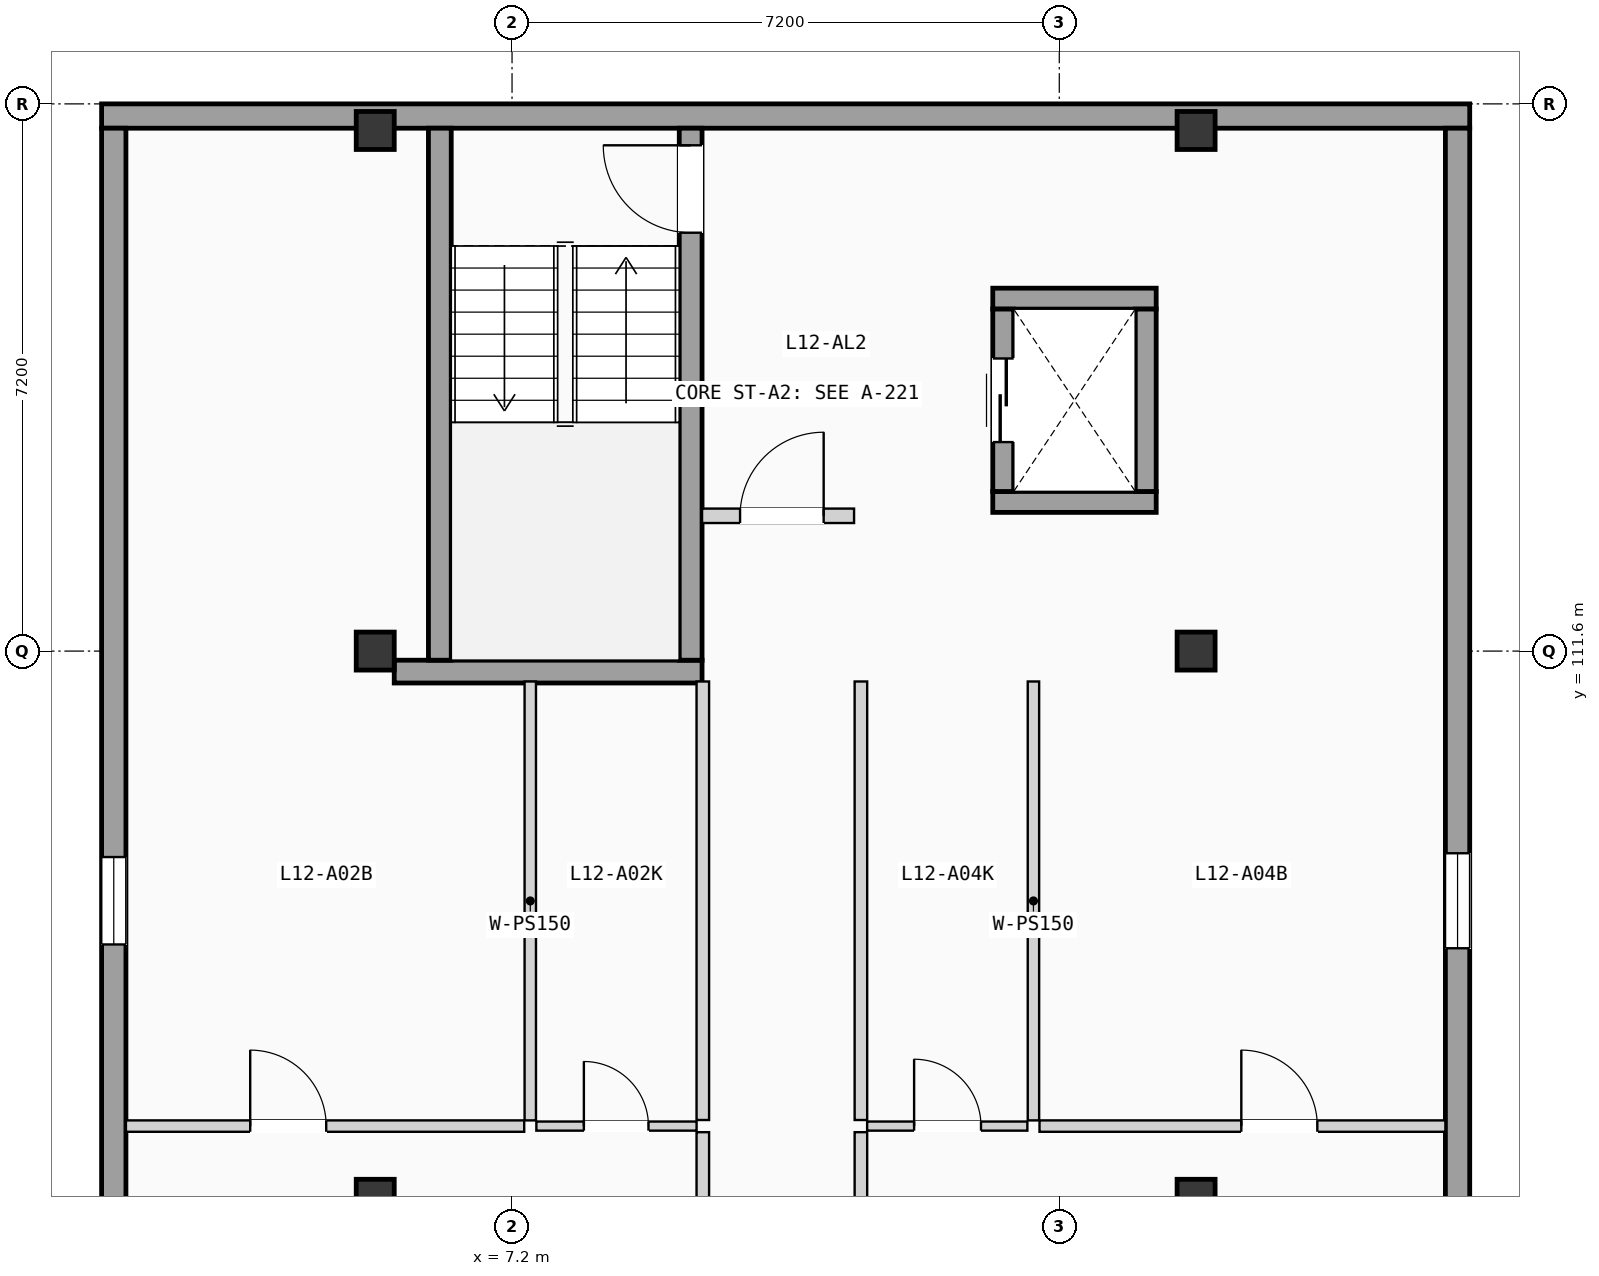
"""IFC4 building model, lengths in metres.
Left out: names, types, materials, properties, quantities, classifications, styles, units other than length and angle.
Written with IfcOpenShell. Run it as: python <this file> out.ifc"""

import sys

from ifc_helpers import new_model, si_unit, direction, frame, frame_2d, origin, origin_2d, place, context, subcontext, project, spatial, rectangle, extrude, element, fill, save


model = new_model("IFC4")
c1 = context("Model", 3, precision=1e-05, world=origin(), true_north=direction((0.0, 1.0)))
c2 = subcontext(c1, "Body", "Model", "MODEL_VIEW")
j1 = project(units=[si_unit("LENGTHUNIT", "METRE"), si_unit("PLANEANGLEUNIT", "RADIAN")], contexts=[c1])
p1 = place(None, origin())
s1 = spatial("IfcSite", under=j1, at=p1, CompositionType="ELEMENT")
p2 = place(p1, origin())
s2 = spatial("IfcBuilding", under=s1, at=p2, CompositionType="ELEMENT")
p3 = place(p2, frame((0.0, 0.0, 40.425)))
s3 = spatial("IfcBuildingStorey", under=s2, at=p3, CompositionType="ELEMENT", Elevation=40.425)
for number, where, z_axis, x_axis in (
    (1, (5.4, 104.4, 0.0), (0.0, 0.0, 1.0), (1.0, 0.0, 0.0)),
    (2, (5.4, 111.6, 0.0), (0.0, 0.0, 1.0), (1.0, 0.0, 0.0)),
    (3, (5.4, 118.45, 0.0), (0.0, 0.0, 1.0), (1.0, 0.0, 0.0)),
    (4, (16.2, 104.4, 0.0), (0.0, 0.0, 1.0), (1.0, 0.0, 0.0)),
    (5, (16.2, 111.6, 0.0), (0.0, 0.0, 1.0), (1.0, 0.0, 0.0)),
    (6, (16.2, 118.45, 0.0), (0.0, 0.0, 1.0), (1.0, 0.0, 0.0)),
):
    element("IfcColumn", number, at=place(p3, frame(where, z_axis=z_axis, x_axis=x_axis)), inside=s3, PredefinedType="COLUMN", context=c2, shape_type="SweptSolid", body=[
        extrude(rectangle(XDim=0.5, YDim=0.5, at=origin_2d()), origin(), (0.0, 0.0, 1.0), 3.15),
    ])
p4 = place(p3, frame((1.8, 118.64, 0.0), z_axis=(0.0, 0.0, 1.0), x_axis=(1.0, 0.0, 0.0)))
e7 = element("IfcWall", 7, at=p4, inside=s3, PredefinedType="SOLIDWALL", context=c2, shape_type="SweptSolid", body=[
    extrude(rectangle(XDim=18.0, YDim=0.32, at=frame_2d((9.0, 0.0))), origin(), (0.0, 0.0, 1.0), 2.89),
])
p5 = place(p3, frame((1.96, 68.72, 0.0), z_axis=(0.0, 0.0, 1.0), x_axis=(0.0, 1.0, 0.0)))
e8 = element("IfcWall", 8, at=p5, inside=s3, PredefinedType="SOLIDWALL", context=c2, shape_type="SweptSolid", body=[
    extrude(rectangle(XDim=49.76, YDim=0.32, at=frame_2d((24.88, 0.0))), origin(), (0.0, 0.0, 1.0), 2.89),
])
p6 = place(p5, frame((12.119, 0.0, 0.9)))
e9 = element("IfcOpeningElement", 9, at=p6, cuts=e8, PredefinedType="OPENING", context=c2, shape_type="SweptSolid", body=[
    extrude(rectangle(XDim=1.05, YDim=1.2, at=frame_2d((0.525, 0.6))), frame((0.0, 0.17, 0.0), z_axis=(0.0, -1.0, 0.0), x_axis=(1.0, 0.0, 0.0)), (0.0, 0.0, 1.0), 0.34),
])
p7 = place(p5, frame((8.774, 0.0, 0.855)))
e10 = element("IfcOpeningElement", 10, at=p7, cuts=e8, PredefinedType="OPENING", context=c2, shape_type="SweptSolid", body=[
    extrude(rectangle(XDim=1.05, YDim=1.35, at=frame_2d((0.525, 0.675))), frame((0.0, 0.17, 0.0), z_axis=(0.0, -1.0, 0.0), x_axis=(1.0, 0.0, 0.0)), (0.0, 0.0, 1.0), 0.34),
])
p8 = place(p5, frame((18.022, 0.0, 0.705)))
e11 = element("IfcOpeningElement", 11, at=p8, cuts=e8, PredefinedType="OPENING", context=c2, shape_type="SweptSolid", body=[
    extrude(rectangle(XDim=1.05, YDim=1.5, at=frame_2d((0.525, 0.75))), frame((0.0, 0.17, 0.0), z_axis=(0.0, -1.0, 0.0), x_axis=(1.0, 0.0, 0.0)), (0.0, 0.0, 1.0), 0.34),
])
p9 = place(p5, frame((31.555, 0.0, 0.555)))
e12 = element("IfcOpeningElement", 12, at=p9, cuts=e8, PredefinedType="OPENING", context=c2, shape_type="SweptSolid", body=[
    extrude(rectangle(XDim=1.05, YDim=1.65, at=frame_2d((0.525, 0.825))), frame((0.0, 0.17, 0.0), z_axis=(0.0, -1.0, 0.0), x_axis=(1.0, 0.0, 0.0)), (0.0, 0.0, 1.0), 0.34),
])
p10 = place(p5, frame((24.002, 0.0, 0.85)))
e13 = element("IfcOpeningElement", 13, at=p10, cuts=e8, PredefinedType="OPENING", context=c2, shape_type="SweptSolid", body=[
    extrude(rectangle(XDim=0.95, YDim=1.2, at=frame_2d((0.475, 0.6))), frame((0.0, 0.17, 0.0), z_axis=(0.0, -1.0, 0.0), x_axis=(1.0, 0.0, 0.0)), (0.0, 0.0, 1.0), 0.34),
])
p11 = place(p5, frame((39.02, 0.0, 0.9)))
e14 = element("IfcOpeningElement", 14, at=p11, cuts=e8, PredefinedType="OPENING", context=c2, shape_type="SweptSolid", body=[
    extrude(rectangle(XDim=1.15, YDim=1.2, at=frame_2d((0.575, 0.6))), frame((0.0, 0.17, 0.0), z_axis=(0.0, -1.0, 0.0), x_axis=(1.0, 0.0, 0.0)), (0.0, 0.0, 1.0), 0.34),
])
p12 = place(p3, frame((19.64, 68.72, 0.0), z_axis=(0.0, 0.0, 1.0), x_axis=(0.0, 1.0, 0.0)))
e15 = element("IfcWall", 15, at=p12, inside=s3, PredefinedType="SOLIDWALL", context=c2, shape_type="SweptSolid", body=[
    extrude(rectangle(XDim=49.76, YDim=0.32, at=frame_2d((24.88, 0.0))), origin(), (0.0, 0.0, 1.0), 2.89),
])
p13 = place(p12, frame((12.069, 0.0, 0.855)))
e16 = element("IfcOpeningElement", 16, at=p13, cuts=e15, PredefinedType="OPENING", context=c2, shape_type="SweptSolid", body=[
    extrude(rectangle(XDim=1.15, YDim=1.35, at=frame_2d((0.575, 0.675))), frame((0.0, 0.17, 0.0), z_axis=(0.0, -1.0, 0.0), x_axis=(1.0, 0.0, 0.0)), (0.0, 0.0, 1.0), 0.34),
])
p14 = place(p12, frame((8.724, 0.0, 0.705)))
e17 = element("IfcOpeningElement", 17, at=p14, cuts=e15, PredefinedType="OPENING", context=c2, shape_type="SweptSolid", body=[
    extrude(rectangle(XDim=1.15, YDim=1.5, at=frame_2d((0.575, 0.75))), frame((0.0, 0.17, 0.0), z_axis=(0.0, -1.0, 0.0), x_axis=(1.0, 0.0, 0.0)), (0.0, 0.0, 1.0), 0.34),
])
p15 = place(p12, frame((17.879, 0.0, 0.0)))
e18 = element("IfcOpeningElement", 18, at=p15, cuts=e15, PredefinedType="OPENING", context=c2, shape_type="SweptSolid", body=[
    extrude(rectangle(XDim=0.95, YDim=2.15, at=frame_2d((0.475, 1.075))), frame((0.0, 0.17, 0.0), z_axis=(0.0, -1.0, 0.0), x_axis=(1.0, 0.0, 0.0)), (0.0, 0.0, 1.0), 0.34),
])
p16 = place(p12, frame((31.505, 0.0, 0.555)))
e19 = element("IfcOpeningElement", 19, at=p16, cuts=e15, PredefinedType="OPENING", context=c2, shape_type="SweptSolid", body=[
    extrude(rectangle(XDim=1.15, YDim=1.65, at=frame_2d((0.575, 0.825))), frame((0.0, 0.17, 0.0), z_axis=(0.0, -1.0, 0.0), x_axis=(1.0, 0.0, 0.0)), (0.0, 0.0, 1.0), 0.34),
])
p17 = place(p12, frame((24.002, 0.0, 0.85)))
e20 = element("IfcOpeningElement", 20, at=p17, cuts=e15, PredefinedType="OPENING", context=c2, shape_type="SweptSolid", body=[
    extrude(rectangle(XDim=0.95, YDim=1.2, at=frame_2d((0.475, 0.6))), frame((0.0, 0.17, 0.0), z_axis=(0.0, -1.0, 0.0), x_axis=(1.0, 0.0, 0.0)), (0.0, 0.0, 1.0), 0.34),
])
p18 = place(p12, frame((38.97, 0.0, 0.9)))
e21 = element("IfcOpeningElement", 21, at=p18, cuts=e15, PredefinedType="OPENING", context=c2, shape_type="SweptSolid", body=[
    extrude(rectangle(XDim=1.25, YDim=1.2, at=frame_2d((0.625, 0.6))), frame((0.0, 0.17, 0.0), z_axis=(0.0, -1.0, 0.0), x_axis=(1.0, 0.0, 0.0)), (0.0, 0.0, 1.0), 0.34),
])
p19 = place(p3, frame((5.65, 111.33, 0.0), z_axis=(0.0, 0.0, 1.0), x_axis=(1.0, 0.0, 0.0)))
e22 = element("IfcWall", 22, at=p19, inside=s3, PredefinedType="SHEAR", context=c2, shape_type="SweptSolid", body=[
    extrude(rectangle(XDim=4.05, YDim=0.3, at=frame_2d((2.025, 0.0))), origin(), (0.0, 0.0, 1.0), 2.89),
])
p20 = place(p3, frame((6.25, 111.48, 0.0), z_axis=(0.0, 0.0, 1.0), x_axis=(0.0, 1.0, 0.0)))
e23 = element("IfcWall", 23, at=p20, inside=s3, PredefinedType="SHEAR", context=c2, shape_type="SweptSolid", body=[
    extrude(rectangle(XDim=7.0, YDim=0.3, at=frame_2d((3.5, 0.0))), origin(), (0.0, 0.0, 1.0), 2.89),
])
p21 = place(p3, frame((9.55, 111.48, 0.0), z_axis=(0.0, 0.0, 1.0), x_axis=(0.0, 1.0, 0.0)))
e24 = element("IfcWall", 24, at=p21, inside=s3, PredefinedType="SHEAR", context=c2, shape_type="SweptSolid", body=[
    extrude(rectangle(XDim=7.0, YDim=0.3, at=frame_2d((3.5, 0.0))), origin(), (0.0, 0.0, 1.0), 2.89),
])
p22 = place(p21, frame((5.625, 0.0, 0.0)))
e25 = element("IfcOpeningElement", 25, at=p22, cuts=e24, PredefinedType="OPENING", context=c2, shape_type="SweptSolid", body=[
    extrude(rectangle(XDim=1.15, YDim=2.12, at=frame_2d((0.575, 1.06))), frame((0.0, 0.16, 0.0), z_axis=(0.0, -1.0, 0.0), x_axis=(1.0, 0.0, 0.0)), (0.0, 0.0, 1.0), 0.32),
])
for number, where, z_axis, x_axis in (
    (26, (13.525, 113.562, 0.0), (0.0, 0.0, 1.0), (1.0, 0.0, 0.0)),
    (27, (13.525, 116.238, 0.0), (0.0, 0.0, 1.0), (1.0, 0.0, 0.0)),
):
    element("IfcWall", number, at=place(p3, frame(where, z_axis=z_axis, x_axis=x_axis)), inside=s3, PredefinedType="SHEAR", context=c2, shape_type="SweptSolid", body=[
        extrude(rectangle(XDim=2.15, YDim=0.275, at=frame_2d((1.075, 0.0))), origin(), (0.0, 0.0, 1.0), 2.89),
    ])
p23 = place(p3, frame((13.663, 113.7, 0.0), z_axis=(0.0, 0.0, 1.0), x_axis=(0.0, 1.0, 0.0)))
e28 = element("IfcWall", 28, at=p23, inside=s3, PredefinedType="SHEAR", context=c2, shape_type="SweptSolid", body=[
    extrude(rectangle(XDim=2.4, YDim=0.275, at=frame_2d((1.2, 0.0))), origin(), (0.0, 0.0, 1.0), 2.89),
])
p24 = place(p23, frame((0.65, 0.0, 0.0)))
e29 = element("IfcOpeningElement", 29, at=p24, cuts=e28, PredefinedType="OPENING", context=c2, shape_type="SweptSolid", body=[
    extrude(rectangle(XDim=1.1, YDim=2.15, at=frame_2d((0.55, 1.075))), frame((0.0, 0.147, 0.0), z_axis=(0.0, -1.0, 0.0), x_axis=(1.0, 0.0, 0.0)), (0.0, 0.0, 1.0), 0.295),
])
p25 = place(p3, frame((15.538, 113.7, 0.0), z_axis=(0.0, 0.0, 1.0), x_axis=(0.0, 1.0, 0.0)))
e30 = element("IfcWall", 30, at=p25, inside=s3, PredefinedType="SHEAR", context=c2, shape_type="SweptSolid", body=[
    extrude(rectangle(XDim=2.4, YDim=0.275, at=frame_2d((1.2, 0.0))), origin(), (0.0, 0.0, 1.0), 2.89),
])
p26 = place(p3, frame((9.7, 113.38, 0.0), z_axis=(0.0, 0.0, 1.0), x_axis=(1.0, 0.0, 0.0)))
e31 = element("IfcWall", 31, at=p26, inside=s3, PredefinedType="PARTITIONING", context=c2, shape_type="SweptSolid", body=[
    extrude(rectangle(XDim=2.0, YDim=0.19, at=frame_2d((1.0, 0.0))), origin(), (0.0, 0.0, 1.0), 2.87),
])
p27 = place(p26, frame((0.5, 0.0, 0.0)))
e32 = element("IfcOpeningElement", 32, at=p27, cuts=e31, PredefinedType="OPENING", context=c2, shape_type="SweptSolid", body=[
    extrude(rectangle(XDim=1.1, YDim=2.12, at=frame_2d((0.55, 1.06))), frame((0.0, 0.105, 0.0), z_axis=(0.0, -1.0, 0.0), x_axis=(1.0, 0.0, 0.0)), (0.0, 0.0, 1.0), 0.21),
])
p28 = place(p3, frame((9.71, 96.284, 0.0), z_axis=(0.0, 0.0, 1.0), x_axis=(0.0, 1.0, 0.0)))
e33 = element("IfcWall", 33, at=p28, inside=s3, PredefinedType="PARTITIONING", context=c2, shape_type="SweptSolid", body=[
    extrude(rectangle(XDim=8.986, YDim=0.165, at=frame_2d((4.493, 0.0))), origin(), (0.0, 0.0, 1.0), 2.87),
])
p29 = place(p28, frame((4.003, 0.0, 0.0)))
e34 = element("IfcOpeningElement", 34, at=p29, cuts=e33, PredefinedType="OPENING", context=c2, shape_type="SweptSolid", body=[
    extrude(rectangle(XDim=0.98, YDim=2.08, at=frame_2d((0.49, 1.04))), frame((0.0, 0.093, 0.0), z_axis=(0.0, -1.0, 0.0), x_axis=(1.0, 0.0, 0.0)), (0.0, 0.0, 1.0), 0.185),
])
p30 = place(p3, frame((9.71, 105.43, 0.0), z_axis=(0.0, 0.0, 1.0), x_axis=(0.0, 1.0, 0.0)))
e35 = element("IfcWall", 35, at=p30, inside=s3, PredefinedType="PARTITIONING", context=c2, shape_type="SweptSolid", body=[
    extrude(rectangle(XDim=5.77, YDim=0.165, at=frame_2d((2.885, 0.0))), origin(), (0.0, 0.0, 1.0), 2.87),
])
p31 = place(p3, frame((11.79, 96.284, 0.0), z_axis=(0.0, 0.0, 1.0), x_axis=(0.0, 1.0, 0.0)))
e36 = element("IfcWall", 36, at=p31, inside=s3, PredefinedType="PARTITIONING", context=c2, shape_type="SweptSolid", body=[
    extrude(rectangle(XDim=8.986, YDim=0.165, at=frame_2d((4.493, 0.0))), origin(), (0.0, 0.0, 1.0), 2.87),
])
p32 = place(p31, frame((4.003, 0.0, 0.0)))
e37 = element("IfcOpeningElement", 37, at=p32, cuts=e36, PredefinedType="OPENING", context=c2, shape_type="SweptSolid", body=[
    extrude(rectangle(XDim=0.98, YDim=2.08, at=frame_2d((0.49, 1.04))), frame((0.0, 0.093, 0.0), z_axis=(0.0, -1.0, 0.0), x_axis=(1.0, 0.0, 0.0)), (0.0, 0.0, 1.0), 0.185),
])
p33 = place(p3, frame((11.79, 105.43, 0.0), z_axis=(0.0, 0.0, 1.0), x_axis=(0.0, 1.0, 0.0)))
e38 = element("IfcWall", 38, at=p33, inside=s3, PredefinedType="PARTITIONING", context=c2, shape_type="SweptSolid", body=[
    extrude(rectangle(XDim=5.77, YDim=0.165, at=frame_2d((2.885, 0.0))), origin(), (0.0, 0.0, 1.0), 2.87),
])
p34 = place(p3, frame((7.52, 105.35, 0.0), z_axis=(0.0, 0.0, 1.0), x_axis=(1.0, 0.0, 0.0)))
e39 = element("IfcWall", 39, at=p34, inside=s3, PredefinedType="PARTITIONING", context=c2, shape_type="SweptSolid", body=[
    extrude(rectangle(XDim=2.108, YDim=0.12, at=frame_2d((1.054, 0.0))), origin(), (0.0, 0.0, 1.0), 2.87),
])
p35 = place(p34, frame((0.625, 0.0, 0.0)))
e40 = element("IfcOpeningElement", 40, at=p35, cuts=e39, PredefinedType="OPENING", context=c2, shape_type="SweptSolid", body=[
    extrude(rectangle(XDim=0.85, YDim=2.01, at=frame_2d((0.425, 1.005))), frame((0.0, 0.07, 0.0), z_axis=(0.0, -1.0, 0.0), x_axis=(1.0, 0.0, 0.0)), (0.0, 0.0, 1.0), 0.14),
])
p36 = place(p3, frame((2.12, 105.35, 0.0), z_axis=(0.0, 0.0, 1.0), x_axis=(1.0, 0.0, 0.0)))
e41 = element("IfcWall", 41, at=p36, inside=s3, PredefinedType="PARTITIONING", context=c2, shape_type="SweptSolid", body=[
    extrude(rectangle(XDim=5.24, YDim=0.15, at=frame_2d((2.62, 0.0))), origin(), (0.0, 0.0, 1.0), 2.87),
])
p37 = place(p36, frame((1.635, 0.0, 0.0)))
e42 = element("IfcOpeningElement", 42, at=p37, cuts=e41, PredefinedType="OPENING", context=c2, shape_type="SweptSolid", body=[
    extrude(rectangle(XDim=1.0, YDim=2.06, at=frame_2d((0.5, 1.03))), frame((0.0, 0.085, 0.0), z_axis=(0.0, -1.0, 0.0), x_axis=(1.0, 0.0, 0.0)), (0.0, 0.0, 1.0), 0.17),
])
p38 = place(p3, frame((7.44, 105.425, 0.0), z_axis=(0.0, 0.0, 1.0), x_axis=(0.0, 1.0, 0.0)))
e43 = element("IfcWall", 43, at=p38, inside=s3, PredefinedType="PARTITIONING", context=c2, shape_type="SweptSolid", body=[
    extrude(rectangle(XDim=5.775, YDim=0.15, at=frame_2d((2.887, 0.0))), origin(), (0.0, 0.0, 1.0), 2.87),
])
p39 = place(p3, frame((11.872, 105.35, 0.0), z_axis=(0.0, 0.0, 1.0), x_axis=(1.0, 0.0, 0.0)))
e44 = element("IfcWall", 44, at=p39, inside=s3, PredefinedType="PARTITIONING", context=c2, shape_type="SweptSolid", body=[
    extrude(rectangle(XDim=2.108, YDim=0.12, at=frame_2d((1.054, 0.0))), origin(), (0.0, 0.0, 1.0), 2.87),
])
p40 = place(p39, frame((0.618, 0.0, 0.0)))
e45 = element("IfcOpeningElement", 45, at=p40, cuts=e44, PredefinedType="OPENING", context=c2, shape_type="SweptSolid", body=[
    extrude(rectangle(XDim=0.88, YDim=2.02, at=frame_2d((0.44, 1.01))), frame((0.0, 0.07, 0.0), z_axis=(0.0, -1.0, 0.0), x_axis=(1.0, 0.0, 0.0)), (0.0, 0.0, 1.0), 0.14),
])
p41 = place(p3, frame((14.14, 105.35, 0.0), z_axis=(0.0, 0.0, 1.0), x_axis=(1.0, 0.0, 0.0)))
e46 = element("IfcWall", 46, at=p41, inside=s3, PredefinedType="PARTITIONING", context=c2, shape_type="SweptSolid", body=[
    extrude(rectangle(XDim=5.34, YDim=0.15, at=frame_2d((2.67, 0.0))), origin(), (0.0, 0.0, 1.0), 2.87),
])
p42 = place(p41, frame((2.655, 0.0, 0.0)))
e47 = element("IfcOpeningElement", 47, at=p42, cuts=e46, PredefinedType="OPENING", context=c2, shape_type="SweptSolid", body=[
    extrude(rectangle(XDim=1.0, YDim=2.06, at=frame_2d((0.5, 1.03))), frame((0.0, 0.085, 0.0), z_axis=(0.0, -1.0, 0.0), x_axis=(1.0, 0.0, 0.0)), (0.0, 0.0, 1.0), 0.17),
])
p43 = place(p3, frame((14.06, 105.425, 0.0), z_axis=(0.0, 0.0, 1.0), x_axis=(0.0, 1.0, 0.0)))
e48 = element("IfcWall", 48, at=p43, inside=s3, PredefinedType="PARTITIONING", context=c2, shape_type="SweptSolid", body=[
    extrude(rectangle(XDim=5.775, YDim=0.15, at=frame_2d((2.887, 0.0))), origin(), (0.0, 0.0, 1.0), 2.87),
])
p44 = place(p11, origin())
e49 = element("IfcWindow", 49, at=p44, inside=s3, PartitioningType="SINGLE_PANEL", PredefinedType="WINDOW", context=c2, shape_type="SweptSolid", body=[
    extrude(rectangle(XDim=1.15, YDim=1.2, at=frame_2d((0.575, 0.6))), frame((0.0, 0.03, 0.0), z_axis=(0.0, -1.0, 0.0), x_axis=(1.0, 0.0, 0.0)), (0.0, 0.0, 1.0), 0.06),
])
fill(e14, e49)
p45 = place(p18, origin())
e50 = element("IfcWindow", 50, at=p45, inside=s3, PartitioningType="SINGLE_PANEL", PredefinedType="WINDOW", context=c2, shape_type="SweptSolid", body=[
    extrude(rectangle(XDim=1.25, YDim=1.2, at=frame_2d((0.625, 0.6))), frame((0.0, 0.03, 0.0), z_axis=(0.0, -1.0, 0.0), x_axis=(1.0, 0.0, 0.0)), (0.0, 0.0, 1.0), 0.06),
])
fill(e21, e50)
p46 = place(p22, origin())
e51 = element("IfcDoor", 51, at=p46, inside=s3, OperationType="SINGLE_SWING_RIGHT", PredefinedType="DOOR", context=c2, shape_type="SweptSolid", body=[
    extrude(rectangle(XDim=1.15, YDim=2.12, at=frame_2d((0.575, 1.06))), frame((0.0, 0.025, 0.0), z_axis=(0.0, -1.0, 0.0), x_axis=(1.0, 0.0, 0.0)), (0.0, 0.0, 1.0), 0.05),
])
fill(e25, e51)
p47 = place(p24, origin())
e52 = element("IfcDoor", 52, at=p47, inside=s3, OperationType="SLIDING_TO_LEFT", PredefinedType="DOOR", context=c2, shape_type="SweptSolid", body=[
    extrude(rectangle(XDim=1.1, YDim=2.15, at=frame_2d((0.55, 1.075))), frame((0.0, 0.025, 0.0), z_axis=(0.0, -1.0, 0.0), x_axis=(1.0, 0.0, 0.0)), (0.0, 0.0, 1.0), 0.05),
])
fill(e29, e52)
p48 = place(p27, origin())
e53 = element("IfcDoor", 53, at=p48, inside=s3, OperationType="SINGLE_SWING_RIGHT", PredefinedType="DOOR", context=c2, shape_type="SweptSolid", body=[
    extrude(rectangle(XDim=1.1, YDim=2.12, at=frame_2d((0.55, 1.06))), frame((0.0, 0.025, 0.0), z_axis=(0.0, -1.0, 0.0), x_axis=(1.0, 0.0, 0.0)), (0.0, 0.0, 1.0), 0.05),
])
fill(e32, e53)
p49 = place(p35, origin())
e54 = element("IfcDoor", 54, at=p49, inside=s3, OperationType="SINGLE_SWING_LEFT", PredefinedType="DOOR", context=c2, shape_type="SweptSolid", body=[
    extrude(rectangle(XDim=0.85, YDim=2.01, at=frame_2d((0.425, 1.005))), frame((0.0, 0.025, 0.0), z_axis=(0.0, -1.0, 0.0), x_axis=(1.0, 0.0, 0.0)), (0.0, 0.0, 1.0), 0.05),
])
fill(e40, e54)
p50 = place(p37, origin())
e55 = element("IfcDoor", 55, at=p50, inside=s3, OperationType="SINGLE_SWING_LEFT", PredefinedType="DOOR", context=c2, shape_type="SweptSolid", body=[
    extrude(rectangle(XDim=1.0, YDim=2.06, at=frame_2d((0.5, 1.03))), frame((0.0, 0.025, 0.0), z_axis=(0.0, -1.0, 0.0), x_axis=(1.0, 0.0, 0.0)), (0.0, 0.0, 1.0), 0.05),
])
fill(e42, e55)
p51 = place(p40, origin())
e56 = element("IfcDoor", 56, at=p51, inside=s3, OperationType="SINGLE_SWING_LEFT", PredefinedType="DOOR", context=c2, shape_type="SweptSolid", body=[
    extrude(rectangle(XDim=0.88, YDim=2.02, at=frame_2d((0.44, 1.01))), frame((0.0, 0.025, 0.0), z_axis=(0.0, -1.0, 0.0), x_axis=(1.0, 0.0, 0.0)), (0.0, 0.0, 1.0), 0.05),
])
fill(e45, e56)
p52 = place(p42, origin())
e57 = element("IfcDoor", 57, at=p52, inside=s3, OperationType="SINGLE_SWING_LEFT", PredefinedType="DOOR", context=c2, shape_type="SweptSolid", body=[
    extrude(rectangle(XDim=1.0, YDim=2.06, at=frame_2d((0.5, 1.03))), frame((0.0, 0.025, 0.0), z_axis=(0.0, -1.0, 0.0), x_axis=(1.0, 0.0, 0.0)), (0.0, 0.0, 1.0), 0.05),
])
fill(e47, e57)
save(model, sys.argv[1])
